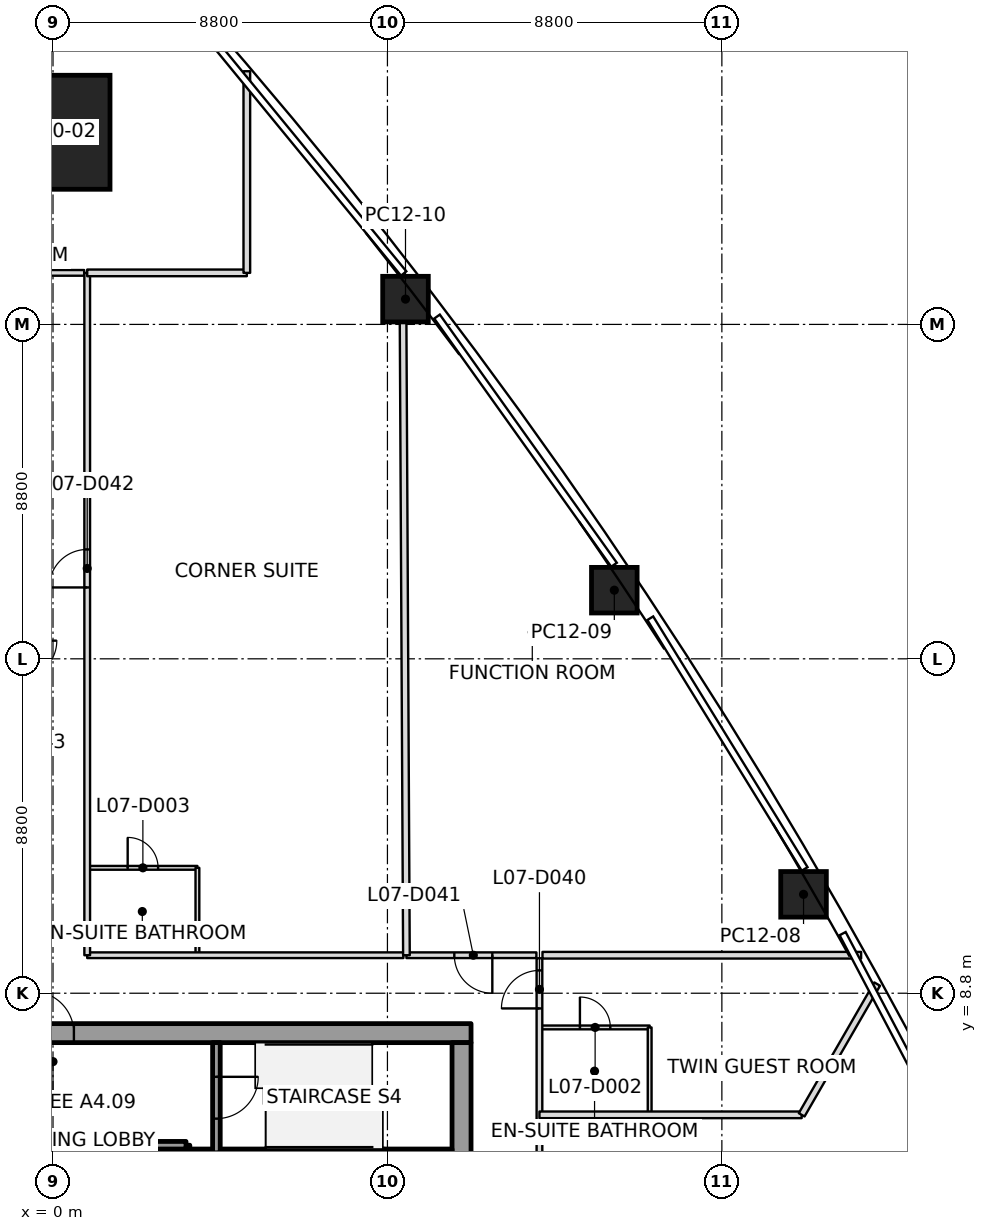
"""IFC4 building model, lengths in metres.
Left out: names, types, materials, properties, quantities, classifications, styles, units other than length and angle.
Written with IfcOpenShell. Run it as: python <this file> out.ifc"""

import sys

from ifc_helpers import new_model, si_unit, direction, frame, frame_2d, origin, origin_2d, place, context, subcontext, project, spatial, rectangle, extrude, clip, halfspace, element, fill, save


model = new_model("IFC4")
c1 = context("Model", 3, precision=1e-05, world=origin(), true_north=direction((0.0, 1.0)))
c2 = subcontext(c1, "Body", "Model", "MODEL_VIEW")
j1 = project(units=[si_unit("LENGTHUNIT", "METRE"), si_unit("PLANEANGLEUNIT", "RADIAN")], contexts=[c1])
p1 = place(None, origin())
s1 = spatial("IfcSite", under=j1, at=p1, CompositionType="ELEMENT")
p2 = place(p1, origin())
s2 = spatial("IfcBuilding", under=s1, at=p2, CompositionType="ELEMENT")
p3 = place(p2, frame((0.0, 0.0, 48.0)))
s3 = spatial("IfcBuildingStorey", under=s2, at=p3, CompositionType="ELEMENT", Elevation=48.0)
p4 = place(p3, frame((0.0, 31.456, 0.0), z_axis=(0.0, -0.03534576554, 0.999375143206), x_axis=(1.0, 0.0, 0.0)))
e1 = element("IfcColumn", 1, at=p4, inside=s3, PredefinedType="COLUMN", context=c2, shape_type="SweptSolid", body=[
    clip(extrude(rectangle(XDim=3.0, YDim=3.0, at=origin_2d()), origin(), (0.0, 0.0, 1.0), 3.702), halfspace(frame((0.0, 0.0, 0.013)), True)),
])
p5 = place(p3, frame((19.749, 11.402, 0.0), z_axis=(-0.010688729499, -0.00613612249, 0.999924046647), x_axis=(-0.49997143695, 0.866041893524, -2.9922579e-05)))
e2 = element("IfcColumn", 2, at=p5, inside=s3, PredefinedType="COLUMN", context=c2, shape_type="SweptSolid", body=[
    clip(extrude(rectangle(XDim=1.2, YDim=1.2, at=origin_2d()), origin(), (0.0, 0.0, 1.0), 3.7), halfspace(frame((0.0, 0.0, 0.002)), True)),
])
p6 = place(p3, frame((14.77, 19.406, 0.0), z_axis=(-0.005674016471, -0.014382971985, 0.999880460682), x_axis=(-0.555854390577, 0.831233065073, 0.008802727192)))
e3 = element("IfcColumn", 3, at=p6, inside=s3, PredefinedType="COLUMN", context=c2, shape_type="SweptSolid", body=[
    clip(extrude(rectangle(XDim=1.2, YDim=1.2, at=origin_2d()), origin(), (0.0, 0.0, 1.0), 3.7), halfspace(frame((0.0, 0.0, 0.003)), True)),
])
p7 = place(p3, frame((9.275, 27.065, 0.0), z_axis=(-0.00019790496, -0.022363260521, 0.999749891429), x_axis=(-0.609322053377, 0.792727229496, 0.017611782556)))
e4 = element("IfcColumn", 4, at=p7, inside=s3, PredefinedType="COLUMN", context=c2, shape_type="SweptSolid", body=[
    clip(extrude(rectangle(XDim=1.2, YDim=1.2, at=origin_2d()), origin(), (0.0, 0.0, 1.0), 3.701), halfspace(frame((0.0, 0.0, 0.005)), True)),
])
p8 = place(p3, frame((-11.0, 7.75, 0.0), z_axis=(0.0, 0.0, 1.0), x_axis=(1.0, 0.0, 0.0)))
e5 = element("IfcWall", 5, at=p8, inside=s3, PredefinedType="SHEAR", context=c2, shape_type="SweptSolid", body=[
    extrude(rectangle(XDim=22.0, YDim=0.5, at=frame_2d((11.0, 0.0))), origin(), (0.0, 0.0, 1.0), 3.7),
])
p9 = place(p8, frame((10.45, 0.0, 0.0)))
e6 = element("IfcOpeningElement", 6, at=p9, cuts=e5, PredefinedType="OPENING", context=c2, shape_type="SweptSolid", body=[
    extrude(rectangle(XDim=1.1, YDim=2.1, at=frame_2d((0.55, 1.05))), frame((0.0, 0.25, 0.0), z_axis=(0.0, -1.0, 0.0), x_axis=(1.0, 0.0, 0.0)), (0.0, 0.0, 1.0), 0.5),
])
p10 = place(p3, frame((10.75, -7.5, 0.0), z_axis=(0.0, 0.0, 1.0), x_axis=(0.0, 1.0, 0.0)))
e7 = element("IfcWall", 7, at=p10, inside=s3, PredefinedType="SHEAR", context=c2, shape_type="SweptSolid", body=[
    extrude(rectangle(XDim=15.0, YDim=0.5, at=frame_2d((7.5, 0.0))), origin(), (0.0, 0.0, 1.0), 3.7),
])
p11 = place(p10, frame((6.6, 0.0, 0.0)))
e8 = element("IfcOpeningElement", 8, at=p11, cuts=e7, PredefinedType="OPENING", context=c2, shape_type="SweptSolid", body=[
    extrude(rectangle(XDim=1.8, YDim=2.1, at=frame_2d((0.9, 1.05))), frame((0.0, 0.25, 0.0), z_axis=(0.0, -1.0, 0.0), x_axis=(1.0, 0.0, 0.0)), (0.0, 0.0, 1.0), 0.5),
])
p12 = place(p3, frame((3.5, 4.6, 0.0), z_axis=(0.0, 0.0, 1.0), x_axis=(0.0, 1.0, 0.0)))
e9 = element("IfcWall", 9, at=p12, inside=s3, PredefinedType="SOLIDWALL", context=c2, shape_type="SweptSolid", body=[
    extrude(rectangle(XDim=0.2, YDim=0.2, at=frame_2d((0.1, 0.0))), origin(), (0.0, 0.0, 1.0), 3.55),
])
p13 = place(p3, frame((3.5, 4.8, 0.0), z_axis=(0.0, 0.0, 1.0), x_axis=(-1.0, 0.0, 0.0)))
e10 = element("IfcWall", 10, at=p13, inside=s3, PredefinedType="SOLIDWALL", context=c2, shape_type="SweptSolid", body=[
    extrude(rectangle(XDim=2.6, YDim=0.2, at=frame_2d((1.3, 0.0))), origin(), (0.0, 0.0, 1.0), 3.55),
])
p14 = place(p3, frame((0.9, 4.8, 0.0), z_axis=(0.0, 0.0, 1.0), x_axis=(0.0, -1.0, 0.0)))
e11 = element("IfcWall", 11, at=p14, inside=s3, PredefinedType="SOLIDWALL", context=c2, shape_type="SweptSolid", body=[
    extrude(rectangle(XDim=3.0, YDim=0.2, at=frame_2d((1.5, 0.0))), origin(), (0.0, 0.0, 1.0), 3.55),
])
p15 = place(p14, frame((0.9, 0.0, 0.0)))
e12 = element("IfcOpeningElement", 12, at=p15, cuts=e11, PredefinedType="OPENING", context=c2, shape_type="SweptSolid", body=[
    extrude(rectangle(XDim=1.2, YDim=2.1, at=frame_2d((0.6, 1.05))), frame((0.0, 0.1, 0.0), z_axis=(0.0, -1.0, 0.0), x_axis=(1.0, 0.0, 0.0)), (0.0, 0.0, 1.0), 0.2),
])
p16 = place(p3, frame((4.3, 4.6, 0.0), z_axis=(0.0, 0.0, 1.0), x_axis=(-1.0, 0.0, 0.0)))
e13 = element("IfcWall", 13, at=p16, inside=s3, PredefinedType="SOLIDWALL", context=c2, shape_type="SweptSolid", body=[
    extrude(rectangle(XDim=0.8, YDim=0.2, at=frame_2d((0.4, 0.0))), origin(), (0.0, 0.0, 1.0), 3.55),
])
p17 = place(p3, frame((6.1, 4.6, 0.0), z_axis=(0.0, 0.0, 1.0), x_axis=(-1.0, 0.0, 0.0)))
e14 = element("IfcWall", 14, at=p17, inside=s3, PredefinedType="SOLIDWALL", context=c2, shape_type="SweptSolid", body=[
    extrude(rectangle(XDim=1.8, YDim=0.2, at=frame_2d((0.9, 0.0))), origin(), (0.0, 0.0, 1.0), 3.55),
])
p18 = place(p3, frame((4.3, 7.5, 0.0), z_axis=(0.0, 0.0, 1.0), x_axis=(0.0, -1.0, 0.0)))
e15 = element("IfcWall", 15, at=p18, inside=s3, PredefinedType="SOLIDWALL", context=c2, shape_type="SweptSolid", body=[
    extrude(rectangle(XDim=2.9, YDim=0.2, at=frame_2d((1.45, 0.0))), origin(), (0.0, 0.0, 1.0), 3.55),
])
p19 = place(p18, frame((0.9, 0.0, 0.0)))
e16 = element("IfcOpeningElement", 16, at=p19, cuts=e15, PredefinedType="OPENING", context=c2, shape_type="SweptSolid", body=[
    extrude(rectangle(XDim=1.1, YDim=2.1, at=frame_2d((0.55, 1.05))), frame((0.0, 0.1, 0.0), z_axis=(0.0, -1.0, 0.0), x_axis=(1.0, 0.0, 0.0)), (0.0, 0.0, 1.0), 0.2),
])
p20 = place(p3, frame((8.7, 4.6, 0.0), z_axis=(0.0, 0.0, 1.0), x_axis=(-1.0, 0.0, 0.0)))
e17 = element("IfcWall", 17, at=p20, inside=s3, PredefinedType="SOLIDWALL", context=c2, shape_type="SweptSolid", body=[
    extrude(rectangle(XDim=2.6, YDim=0.2, at=frame_2d((1.3, 0.0))), origin(), (0.0, 0.0, 1.0), 3.55),
])
p21 = place(p3, frame((10.5, 4.6, 0.0), z_axis=(0.0, 0.0, 1.0), x_axis=(-1.0, 0.0, 0.0)))
e18 = element("IfcWall", 18, at=p21, inside=s3, PredefinedType="SOLIDWALL", context=c2, shape_type="SweptSolid", body=[
    extrude(rectangle(XDim=1.8, YDim=0.2, at=frame_2d((0.9, 0.0))), origin(), (0.0, 0.0, 1.0), 3.55),
])
p22 = place(p3, frame((0.9, 27.756, 0.0), z_axis=(0.0, 0.0, 1.0), x_axis=(1.0, 0.0, 0.0)))
e19 = element("IfcWall", 19, at=p22, inside=s3, PredefinedType="PARTITIONING", context=c2, shape_type="SweptSolid", body=[
    extrude(rectangle(XDim=4.2, YDim=0.175, at=frame_2d((2.1, 0.0))), origin(), (0.0, 0.0, 1.0), 3.15),
])
p23 = place(p3, frame((5.1, 27.756, 0.0), z_axis=(0.0, 0.0, 1.0), x_axis=(0.0, 1.0, 0.0)))
e20 = element("IfcWall", 20, at=p23, inside=s3, PredefinedType="PARTITIONING", context=c2, shape_type="SweptSolid", body=[
    extrude(rectangle(XDim=5.306, YDim=0.175, at=frame_2d((2.653, 0.0))), origin(), (0.0, 0.0, 1.0), 2.934),
])
p24 = place(p3, frame((9.206, 27.667, 0.0), z_axis=(0.0, 0.0, 1.0), x_axis=(0.005288111679, -0.99998601784, 0.0)))
e21 = element("IfcWall", 21, at=p24, inside=s3, PredefinedType="PARTITIONING", context=c2, shape_type="SweptSolid", body=[
    extrude(rectangle(XDim=17.867, YDim=0.175, at=frame_2d((8.934, 0.0))), origin(), (0.0, 0.0, 1.0), 2.947),
])
p25 = place(p3, frame((12.8, 5.6, 0.0), z_axis=(0.0, 0.0, 1.0), x_axis=(1.0, 0.0, 0.0)))
e22 = element("IfcWall", 22, at=p25, inside=s3, PredefinedType="PARTITIONING", context=c2, shape_type="SweptSolid", body=[
    extrude(rectangle(XDim=6.9, YDim=0.175, at=frame_2d((3.45, 0.0))), origin(), (0.0, 0.0, 1.0), 3.093),
])
p26 = place(p3, frame((19.7, 5.6, 0.0), z_axis=(0.0, 0.0, 1.0), x_axis=(0.500045167768, 0.865999324591, 0.0)))
e23 = element("IfcWall", 23, at=p26, inside=s3, PredefinedType="PARTITIONING", context=c2, shape_type="SweptSolid", body=[
    extrude(rectangle(XDim=3.973, YDim=0.175, at=frame_2d((1.986, 0.0))), origin(), (0.0, 0.0, 1.0), 2.934),
])
p27 = place(p3, frame((12.88, 9.8, 0.0), z_axis=(0.0, 0.0, 1.0), x_axis=(1.0, 0.0, 0.0)))
e24 = element("IfcWall", 24, at=p27, inside=s3, PredefinedType="PARTITIONING", context=c2, shape_type="SweptSolid", body=[
    extrude(rectangle(XDim=8.385, YDim=0.175, at=frame_2d((4.192, 0.0))), origin(), (0.0, 0.0, 1.0), 2.934),
])
p28 = place(p3, frame((0.82, 27.756, 0.0), z_axis=(0.0, 0.0, 1.0), x_axis=(-1.0, 0.0, 0.0)))
e25 = element("IfcWall", 25, at=p28, inside=s3, PredefinedType="PARTITIONING", context=c2, shape_type="SweptSolid", body=[
    extrude(rectangle(XDim=1.64, YDim=0.15, at=frame_2d((0.82, 0.0))), origin(), (0.0, 0.0, 1.0), 2.797),
])
p29 = place(p3, frame((9.22, 9.8, 0.0), z_axis=(0.0, 0.0, 1.0), x_axis=(-1.0, 0.0, 0.0)))
e26 = element("IfcWall", 26, at=p29, inside=s3, PredefinedType="PARTITIONING", context=c2, shape_type="SweptSolid", body=[
    extrude(rectangle(XDim=8.32, YDim=0.15, at=frame_2d((4.16, 0.0))), origin(), (0.0, 0.0, 1.0), 2.947),
])
p30 = place(p3, frame((0.9, 9.8, 0.0), z_axis=(0.0, 0.0, 1.0), x_axis=(0.0, 1.0, 0.0)))
e27 = element("IfcWall", 27, at=p30, inside=s3, PredefinedType="PARTITIONING", context=c2, shape_type="SweptSolid", body=[
    extrude(rectangle(XDim=17.956, YDim=0.15, at=frame_2d((8.978, 0.0))), origin(), (0.0, 0.0, 1.0), 2.947),
])
p31 = place(p30, frame((9.678, 0.0, 0.0)))
e28 = element("IfcOpeningElement", 28, at=p31, cuts=e27, PredefinedType="OPENING", context=c2, shape_type="SweptSolid", body=[
    extrude(rectangle(XDim=1.0, YDim=2.1, at=frame_2d((0.5, 1.05))), frame((0.0, 0.075, 0.0), z_axis=(0.0, -1.0, 0.0), x_axis=(1.0, 0.0, 0.0)), (0.0, 0.0, 1.0), 0.15),
])
p32 = place(p3, frame((12.72, 9.8, 0.0), z_axis=(0.0, 0.0, 1.0), x_axis=(-1.0, 0.0, 0.0)))
e29 = element("IfcWall", 29, at=p32, inside=s3, PredefinedType="PARTITIONING", context=c2, shape_type="SweptSolid", body=[
    extrude(rectangle(XDim=3.42, YDim=0.15, at=frame_2d((1.71, 0.0))), origin(), (0.0, 0.0, 1.0), 3.017),
])
p33 = place(p32, frame((1.16, 0.0, 0.0)))
e30 = element("IfcOpeningElement", 30, at=p33, cuts=e29, PredefinedType="OPENING", context=c2, shape_type="SweptSolid", body=[
    extrude(rectangle(XDim=1.0, YDim=2.1, at=frame_2d((0.5, 1.05))), frame((0.0, 0.075, 0.0), z_axis=(0.0, -1.0, 0.0), x_axis=(1.0, 0.0, 0.0)), (0.0, 0.0, 1.0), 0.15),
])
p34 = place(p3, frame((12.8, -6.351, 0.0), z_axis=(0.0, 0.0, 1.0), x_axis=(0.0, 1.0, 0.0)))
e31 = element("IfcWall", 31, at=p34, inside=s3, PredefinedType="PARTITIONING", context=c2, shape_type="SweptSolid", body=[
    extrude(rectangle(XDim=16.071, YDim=0.15, at=frame_2d((8.035, 0.0))), origin(), (0.0, 0.0, 1.0), 3.017),
])
p35 = place(p34, frame((6.676, 0.0, 0.0)))
e32 = element("IfcOpeningElement", 32, at=p35, cuts=e31, PredefinedType="OPENING", context=c2, shape_type="SweptSolid", body=[
    extrude(rectangle(XDim=1.0, YDim=2.1, at=frame_2d((0.5, 1.05))), frame((0.0, 0.075, 0.0), z_axis=(0.0, -1.0, 0.0), x_axis=(1.0, 0.0, 0.0)), (0.0, 0.0, 1.0), 0.15),
])
p36 = place(p34, frame((14.751, 0.0, 0.0)))
e33 = element("IfcOpeningElement", 33, at=p36, cuts=e31, PredefinedType="OPENING", context=c2, shape_type="SweptSolid", body=[
    extrude(rectangle(XDim=1.0, YDim=2.1, at=frame_2d((0.5, 1.05))), frame((0.0, 0.075, 0.0), z_axis=(0.0, -1.0, 0.0), x_axis=(1.0, 0.0, 0.0)), (0.0, 0.0, 1.0), 0.15),
])
p37 = place(p3, frame((0.93, 12.1, 0.0), z_axis=(0.0, 0.0, 1.0), x_axis=(1.0, 0.0, 0.0)))
e34 = element("IfcWall", 34, at=p37, inside=s3, PredefinedType="PARTITIONING", context=c2, shape_type="SweptSolid", body=[
    extrude(rectangle(XDim=2.87, YDim=0.1, at=frame_2d((1.435, 0.0))), origin(), (0.0, 0.0, 1.0), 3.15),
])
p38 = place(p37, frame((1.035, 0.0, 0.0)))
e35 = element("IfcOpeningElement", 35, at=p38, cuts=e34, PredefinedType="OPENING", context=c2, shape_type="SweptSolid", body=[
    extrude(rectangle(XDim=0.8, YDim=2.1, at=frame_2d((0.4, 1.05))), frame((0.0, 0.05, 0.0), z_axis=(0.0, -1.0, 0.0), x_axis=(1.0, 0.0, 0.0)), (0.0, 0.0, 1.0), 0.1),
])
p39 = place(p3, frame((3.8, 12.1, 0.0), z_axis=(0.0, 0.0, 1.0), x_axis=(0.0, -1.0, 0.0)))
e36 = element("IfcWall", 36, at=p39, inside=s3, PredefinedType="PARTITIONING", context=c2, shape_type="SweptSolid", body=[
    extrude(rectangle(XDim=2.27, YDim=0.1, at=frame_2d((1.135, 0.0))), origin(), (0.0, 0.0, 1.0), 3.15),
])
p40 = place(p3, frame((12.83, 7.9, 0.0), z_axis=(0.0, 0.0, 1.0), x_axis=(1.0, 0.0, 0.0)))
e37 = element("IfcWall", 37, at=p40, inside=s3, PredefinedType="PARTITIONING", context=c2, shape_type="SweptSolid", body=[
    extrude(rectangle(XDim=2.87, YDim=0.1, at=frame_2d((1.435, 0.0))), origin(), (0.0, 0.0, 1.0), 3.15),
])
p41 = place(p40, frame((1.035, 0.0, 0.0)))
e38 = element("IfcOpeningElement", 38, at=p41, cuts=e37, PredefinedType="OPENING", context=c2, shape_type="SweptSolid", body=[
    extrude(rectangle(XDim=0.8, YDim=2.1, at=frame_2d((0.4, 1.05))), frame((0.0, 0.05, 0.0), z_axis=(0.0, -1.0, 0.0), x_axis=(1.0, 0.0, 0.0)), (0.0, 0.0, 1.0), 0.1),
])
p42 = place(p3, frame((15.7, 7.9, 0.0), z_axis=(0.0, 0.0, 1.0), x_axis=(0.0, -1.0, 0.0)))
e39 = element("IfcWall", 39, at=p42, inside=s3, PredefinedType="PARTITIONING", context=c2, shape_type="SweptSolid", body=[
    extrude(rectangle(XDim=2.27, YDim=0.1, at=frame_2d((1.135, 0.0))), origin(), (0.0, 0.0, 1.0), 3.15),
])
p43 = place(p36, origin())
e40 = element("IfcDoor", 40, at=p43, inside=s3, OperationType="SINGLE_SWING_LEFT", PredefinedType="DOOR", context=c2, shape_type="SweptSolid", body=[
    extrude(rectangle(XDim=1.0, YDim=2.1, at=frame_2d((0.5, 1.05))), frame((0.0, 0.025, 0.0), z_axis=(0.0, -1.0, 0.0), x_axis=(1.0, 0.0, 0.0)), (0.0, 0.0, 1.0), 0.05),
])
fill(e33, e40)
p44 = place(p41, origin())
e41 = element("IfcDoor", 41, at=p44, inside=s3, OperationType="SINGLE_SWING_RIGHT", PredefinedType="DOOR", context=c2, shape_type="SweptSolid", body=[
    extrude(rectangle(XDim=0.8, YDim=2.1, at=frame_2d((0.4, 1.05))), frame((0.0, 0.025, 0.0), z_axis=(0.0, -1.0, 0.0), x_axis=(1.0, 0.0, 0.0)), (0.0, 0.0, 1.0), 0.05),
])
fill(e38, e41)
p45 = place(p33, origin())
e42 = element("IfcDoor", 42, at=p45, inside=s3, OperationType="SINGLE_SWING_RIGHT", PredefinedType="DOOR", context=c2, shape_type="SweptSolid", body=[
    extrude(rectangle(XDim=1.0, YDim=2.1, at=frame_2d((0.5, 1.05))), frame((0.0, 0.025, 0.0), z_axis=(0.0, -1.0, 0.0), x_axis=(1.0, 0.0, 0.0)), (0.0, 0.0, 1.0), 0.05),
])
fill(e30, e42)
p46 = place(p31, origin())
e43 = element("IfcDoor", 43, at=p46, inside=s3, OperationType="SINGLE_SWING_LEFT", PredefinedType="DOOR", context=c2, shape_type="SweptSolid", body=[
    extrude(rectangle(XDim=1.0, YDim=2.1, at=frame_2d((0.5, 1.05))), frame((0.0, 0.025, 0.0), z_axis=(0.0, -1.0, 0.0), x_axis=(1.0, 0.0, 0.0)), (0.0, 0.0, 1.0), 0.05),
])
fill(e28, e43)
p47 = place(p38, origin())
e44 = element("IfcDoor", 44, at=p47, inside=s3, OperationType="SINGLE_SWING_LEFT", PredefinedType="DOOR", context=c2, shape_type="SweptSolid", body=[
    extrude(rectangle(XDim=0.8, YDim=2.1, at=frame_2d((0.4, 1.05))), frame((0.0, 0.025, 0.0), z_axis=(0.0, -1.0, 0.0), x_axis=(1.0, 0.0, 0.0)), (0.0, 0.0, 1.0), 0.05),
])
fill(e35, e44)
p48 = place(p19, origin())
e45 = element("IfcDoor", 45, at=p48, inside=s3, OperationType="SINGLE_SWING_RIGHT", PredefinedType="DOOR", context=c2, shape_type="SweptSolid", body=[
    extrude(rectangle(XDim=1.1, YDim=2.1, at=frame_2d((0.55, 1.05))), frame((0.0, 0.025, 0.0), z_axis=(0.0, -1.0, 0.0), x_axis=(1.0, 0.0, 0.0)), (0.0, 0.0, 1.0), 0.05),
])
fill(e16, e45)
p49 = place(p9, origin())
e46 = element("IfcDoor", 46, at=p49, inside=s3, OperationType="SINGLE_SWING_RIGHT", PredefinedType="DOOR", context=c2, shape_type="SweptSolid", body=[
    extrude(rectangle(XDim=1.1, YDim=2.1, at=frame_2d((0.55, 1.05))), frame((0.0, 0.025, 0.0), z_axis=(0.0, -1.0, 0.0), x_axis=(1.0, 0.0, 0.0)), (0.0, 0.0, 1.0), 0.05),
])
fill(e6, e46)
save(model, sys.argv[1])
